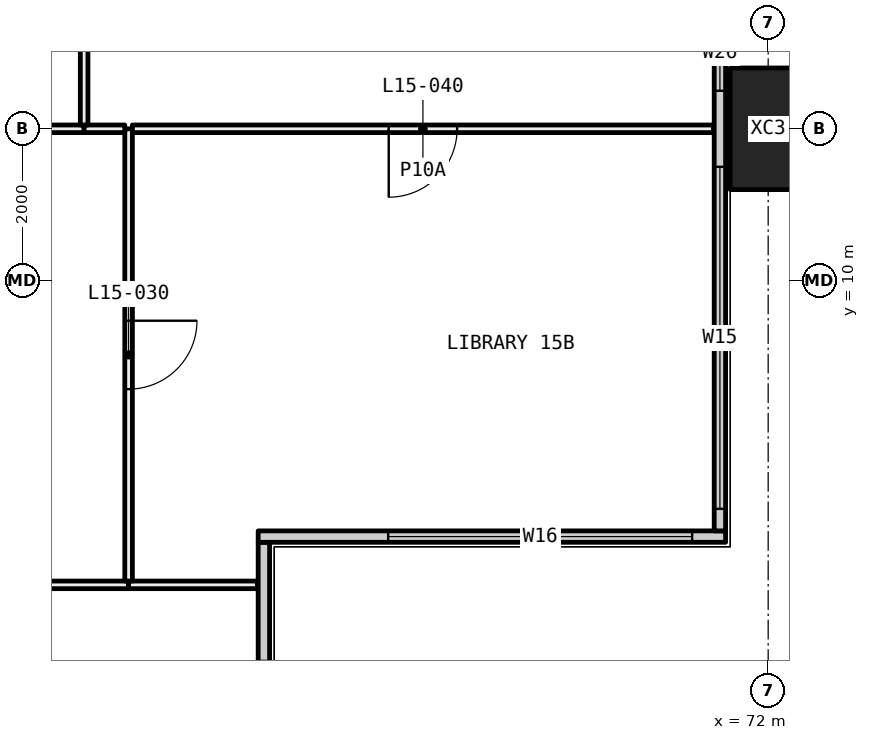
"""IFC4 building model, lengths in metres.
Left out: names, types, materials, properties, quantities, classifications, styles, units other than length and angle.
Written with IfcOpenShell. Run it as: python <this file> out.ifc"""

import sys

from ifc_helpers import new_model, si_unit, direction, frame, frame_2d, origin, origin_2d, place, context, subcontext, project, spatial, rectangle, hollow_rectangle, extrude, element, fill, save


model = new_model("IFC4")
c1 = context("Model", 3, precision=1e-05, world=origin(), true_north=direction((0.0, 1.0)))
c2 = subcontext(c1, "Body", "Model", "MODEL_VIEW")
j1 = project(units=[si_unit("LENGTHUNIT", "METRE"), si_unit("PLANEANGLEUNIT", "RADIAN")], contexts=[c1])
p1 = place(None, origin())
s1 = spatial("IfcSite", under=j1, at=p1, CompositionType="ELEMENT")
p2 = place(p1, origin())
s2 = spatial("IfcBuilding", under=s1, at=p2, CompositionType="ELEMENT")
p3 = place(p2, frame((0.0, 0.0, 64.5)))
s3 = spatial("IfcBuildingStorey", under=s2, at=p3, CompositionType="ELEMENT", Elevation=64.5)
p4 = place(p3, frame((72.0, 12.0, -0.4), z_axis=(0.0, 0.0, 1.0), x_axis=(0.0, 1.0, 0.0)))
e1 = element("IfcColumn", 1, at=p4, inside=s3, PredefinedType="COLUMN", context=c2, shape_type="SweptSolid", body=[
    extrude(hollow_rectangle(XDim=1.6, YDim=1.0, WallThickness=0.065, at=origin_2d()), origin(), (0.0, 0.0, 1.0), 3.45),
])
p5 = place(p3, frame((65.365, 0.71, 0.0), z_axis=(0.0, 0.0, 1.0), x_axis=(0.0, 1.0, 0.0)))
e2 = element("IfcWall", 2, at=p5, inside=s3, PredefinedType="ELEMENTEDWALL", context=c2, shape_type="SweptSolid", body=[
    extrude(rectangle(XDim=5.85, YDim=0.15, at=frame_2d((2.925, 0.0))), origin(), (0.0, 0.0, 1.0), 3.05),
])
p6 = place(p5, frame((0.29, 0.0, 0.45)))
e3 = element("IfcOpeningElement", 3, at=p6, cuts=e2, PredefinedType="OPENING", context=c2, shape_type="SweptSolid", body=[
    extrude(rectangle(XDim=4.0, YDim=2.55, at=frame_2d((2.0, 1.275))), frame((0.0, 0.085, 0.0), z_axis=(0.0, -1.0, 0.0), x_axis=(1.0, 0.0, 0.0)), (0.0, 0.0, 1.0), 0.17),
])
p7 = place(p3, frame((65.29, 6.635, 0.0), z_axis=(0.0, 0.0, 1.0), x_axis=(1.0, 0.0, 0.0)))
e4 = element("IfcWall", 4, at=p7, inside=s3, PredefinedType="ELEMENTEDWALL", context=c2, shape_type="SweptSolid", body=[
    extrude(rectangle(XDim=6.15, YDim=0.15, at=frame_2d((3.075, 0.0))), origin(), (0.0, 0.0, 1.0), 3.05),
])
p8 = place(p7, frame((1.71, 0.0, 0.45)))
e5 = element("IfcOpeningElement", 5, at=p8, cuts=e4, PredefinedType="OPENING", context=c2, shape_type="SweptSolid", body=[
    extrude(rectangle(XDim=4.0, YDim=2.55, at=frame_2d((2.0, 1.275))), frame((0.0, 0.085, 0.0), z_axis=(0.0, -1.0, 0.0), x_axis=(1.0, 0.0, 0.0)), (0.0, 0.0, 1.0), 0.17),
])
p9 = place(p3, frame((71.365, 6.71, 0.0), z_axis=(0.0, 0.0, 1.0), x_axis=(0.0, 1.0, 0.0)))
e6 = element("IfcWall", 6, at=p9, inside=s3, PredefinedType="ELEMENTEDWALL", context=c2, shape_type="SweptSolid", body=[
    extrude(rectangle(XDim=34.58, YDim=0.15, at=frame_2d((17.29, 0.0))), origin(), (0.0, 0.0, 1.0), 3.05),
])
p10 = place(p9, frame((0.29, 0.0, 0.45)))
e7 = element("IfcOpeningElement", 7, at=p10, cuts=e6, PredefinedType="OPENING", context=c2, shape_type="SweptSolid", body=[
    extrude(rectangle(XDim=4.5, YDim=2.55, at=frame_2d((2.25, 1.275))), frame((0.0, 0.085, 0.0), z_axis=(0.0, -1.0, 0.0), x_axis=(1.0, 0.0, 0.0)), (0.0, 0.0, 1.0), 0.17),
])
p11 = place(p9, frame((5.79, 0.0, 0.45)))
e8 = element("IfcOpeningElement", 8, at=p11, cuts=e6, PredefinedType="OPENING", context=c2, shape_type="SweptSolid", body=[
    extrude(rectangle(XDim=1.0, YDim=2.55, at=frame_2d((0.5, 1.275))), frame((0.0, 0.085, 0.0), z_axis=(0.0, -1.0, 0.0), x_axis=(1.0, 0.0, 0.0)), (0.0, 0.0, 1.0), 0.17),
])
p12 = place(p9, frame((9.54, 0.0, 0.45)))
e9 = element("IfcOpeningElement", 9, at=p12, cuts=e6, PredefinedType="OPENING", context=c2, shape_type="SweptSolid", body=[
    extrude(rectangle(XDim=1.25, YDim=2.55, at=frame_2d((0.625, 1.275))), frame((0.0, 0.085, 0.0), z_axis=(0.0, -1.0, 0.0), x_axis=(1.0, 0.0, 0.0)), (0.0, 0.0, 1.0), 0.17),
])
p13 = place(p9, frame((11.79, 0.0, 0.45)))
e10 = element("IfcOpeningElement", 10, at=p13, cuts=e6, PredefinedType="OPENING", context=c2, shape_type="SweptSolid", body=[
    extrude(rectangle(XDim=1.25, YDim=2.55, at=frame_2d((0.625, 1.275))), frame((0.0, 0.085, 0.0), z_axis=(0.0, -1.0, 0.0), x_axis=(1.0, 0.0, 0.0)), (0.0, 0.0, 1.0), 0.17),
])
p14 = place(p9, frame((15.79, 0.0, 0.45)))
e11 = element("IfcOpeningElement", 11, at=p14, cuts=e6, PredefinedType="OPENING", context=c2, shape_type="SweptSolid", body=[
    extrude(rectangle(XDim=1.0, YDim=2.55, at=frame_2d((0.5, 1.275))), frame((0.0, 0.085, 0.0), z_axis=(0.0, -1.0, 0.0), x_axis=(1.0, 0.0, 0.0)), (0.0, 0.0, 1.0), 0.17),
])
p15 = place(p9, frame((17.79, 0.0, 0.45)))
e12 = element("IfcOpeningElement", 12, at=p15, cuts=e6, PredefinedType="OPENING", context=c2, shape_type="SweptSolid", body=[
    extrude(rectangle(XDim=1.0, YDim=2.55, at=frame_2d((0.5, 1.275))), frame((0.0, 0.085, 0.0), z_axis=(0.0, -1.0, 0.0), x_axis=(1.0, 0.0, 0.0)), (0.0, 0.0, 1.0), 0.17),
])
p16 = place(p9, frame((21.54, 0.0, 0.45)))
e13 = element("IfcOpeningElement", 13, at=p16, cuts=e6, PredefinedType="OPENING", context=c2, shape_type="SweptSolid", body=[
    extrude(rectangle(XDim=1.25, YDim=2.55, at=frame_2d((0.625, 1.275))), frame((0.0, 0.085, 0.0), z_axis=(0.0, -1.0, 0.0), x_axis=(1.0, 0.0, 0.0)), (0.0, 0.0, 1.0), 0.17),
])
p17 = place(p9, frame((23.79, 0.0, 0.45)))
e14 = element("IfcOpeningElement", 14, at=p17, cuts=e6, PredefinedType="OPENING", context=c2, shape_type="SweptSolid", body=[
    extrude(rectangle(XDim=1.25, YDim=2.55, at=frame_2d((0.625, 1.275))), frame((0.0, 0.085, 0.0), z_axis=(0.0, -1.0, 0.0), x_axis=(1.0, 0.0, 0.0)), (0.0, 0.0, 1.0), 0.17),
])
p18 = place(p9, frame((27.79, 0.0, 0.45)))
e15 = element("IfcOpeningElement", 15, at=p18, cuts=e6, PredefinedType="OPENING", context=c2, shape_type="SweptSolid", body=[
    extrude(rectangle(XDim=1.0, YDim=2.55, at=frame_2d((0.5, 1.275))), frame((0.0, 0.085, 0.0), z_axis=(0.0, -1.0, 0.0), x_axis=(1.0, 0.0, 0.0)), (0.0, 0.0, 1.0), 0.17),
])
p19 = place(p9, frame((29.79, 0.0, 0.45)))
e16 = element("IfcOpeningElement", 16, at=p19, cuts=e6, PredefinedType="OPENING", context=c2, shape_type="SweptSolid", body=[
    extrude(rectangle(XDim=4.5, YDim=2.55, at=frame_2d((2.25, 1.275))), frame((0.0, 0.085, 0.0), z_axis=(0.0, -1.0, 0.0), x_axis=(1.0, 0.0, 0.0)), (0.0, 0.0, 1.0), 0.17),
])
p20 = place(p3, frame((63.585, 6.0, 0.0), z_axis=(0.0, 0.0, 1.0), x_axis=(-1.0, 0.0, 0.0)))
e17 = element("IfcWall", 17, at=p20, inside=s3, PredefinedType="PARTITIONING", context=c2, shape_type="SweptSolid", body=[
    extrude(rectangle(XDim=3.535, YDim=0.1, at=frame_2d((1.768, 0.0))), origin(), (0.0, 0.0, 1.0), 2.45),
])
p21 = place(p20, frame((1.317, 0.0, 0.0)))
e18 = element("IfcOpeningElement", 18, at=p21, cuts=e17, PredefinedType="OPENING", context=c2, shape_type="SweptSolid", body=[
    extrude(rectangle(XDim=0.9, YDim=2.1, at=frame_2d((0.45, 1.05))), frame((0.0, 0.06, 0.0), z_axis=(0.0, -1.0, 0.0), x_axis=(1.0, 0.0, 0.0)), (0.0, 0.0, 1.0), 0.12),
])
p22 = place(p3, frame((65.28, 6.0, 0.0), z_axis=(0.0, 0.0, 1.0), x_axis=(-1.0, 0.0, 0.0)))
e19 = element("IfcWall", 19, at=p22, inside=s3, PredefinedType="PARTITIONING", context=c2, shape_type="SweptSolid", body=[
    extrude(rectangle(XDim=1.695, YDim=0.1, at=frame_2d((0.848, 0.0))), origin(), (0.0, 0.0, 1.0), 3.05),
])
p23 = place(p3, frame((63.585, 6.05, 0.0), z_axis=(0.0, 0.0, 1.0), x_axis=(0.0, 1.0, 0.0)))
e20 = element("IfcWall", 20, at=p23, inside=s3, PredefinedType="PARTITIONING", context=c2, shape_type="SweptSolid", body=[
    extrude(rectangle(XDim=5.95, YDim=0.1, at=frame_2d((2.975, 0.0))), origin(), (0.0, 0.0, 1.0), 2.45),
])
p24 = place(p23, frame((2.525, 0.0, 0.0)))
e21 = element("IfcOpeningElement", 21, at=p24, cuts=e20, PredefinedType="OPENING", context=c2, shape_type="SweptSolid", body=[
    extrude(rectangle(XDim=0.9, YDim=2.1, at=frame_2d((0.45, 1.05))), frame((0.0, 0.06, 0.0), z_axis=(0.0, -1.0, 0.0), x_axis=(1.0, 0.0, 0.0)), (0.0, 0.0, 1.0), 0.12),
])
p25 = place(p3, frame((63.0, 12.0, 0.0), z_axis=(0.0, 0.0, 1.0), x_axis=(-1.0, 0.0, 0.0)))
e22 = element("IfcWall", 22, at=p25, inside=s3, PredefinedType="PARTITIONING", context=c2, shape_type="SweptSolid", body=[
    extrude(rectangle(XDim=2.2, YDim=0.1, at=frame_2d((1.1, 0.0))), origin(), (0.0, 0.0, 1.0), 2.45),
])
p26 = place(p3, frame((63.535, 12.0, 0.0), z_axis=(0.0, 0.0, 1.0), x_axis=(-1.0, 0.0, 0.0)))
e23 = element("IfcWall", 23, at=p26, inside=s3, PredefinedType="PARTITIONING", context=c2, shape_type="SweptSolid", body=[
    extrude(rectangle(XDim=0.535, YDim=0.1, at=frame_2d((0.268, 0.0))), origin(), (0.0, 0.0, 1.0), 2.45),
])
p27 = place(p3, frame((71.28, 12.0, 0.0), z_axis=(0.0, 0.0, 1.0), x_axis=(-1.0, 0.0, 0.0)))
e24 = element("IfcWall", 24, at=p27, inside=s3, PredefinedType="PARTITIONING", context=c2, shape_type="SweptSolid", body=[
    extrude(rectangle(XDim=7.645, YDim=0.1, at=frame_2d((3.823, 0.0))), origin(), (0.0, 0.0, 1.0), 2.45),
])
p28 = place(p27, frame((3.373, 0.0, 0.0)))
e25 = element("IfcOpeningElement", 25, at=p28, cuts=e24, PredefinedType="OPENING", context=c2, shape_type="SweptSolid", body=[
    extrude(rectangle(XDim=0.9, YDim=2.1, at=frame_2d((0.45, 1.05))), frame((0.0, 0.06, 0.0), z_axis=(0.0, -1.0, 0.0), x_axis=(1.0, 0.0, 0.0)), (0.0, 0.0, 1.0), 0.12),
])
p29 = place(p3, frame((63.0, 12.05, 0.0), z_axis=(0.0, 0.0, 1.0), x_axis=(0.0, 1.0, 0.0)))
e26 = element("IfcWall", 26, at=p29, inside=s3, PredefinedType="PARTITIONING", context=c2, shape_type="SweptSolid", body=[
    extrude(rectangle(XDim=5.85, YDim=0.1, at=frame_2d((2.925, 0.0))), origin(), (0.0, 0.0, 1.0), 2.45),
])
p30 = place(p8, origin())
e27 = element("IfcWindow", 27, at=p30, inside=s3, PartitioningType="SINGLE_PANEL", PredefinedType="WINDOW", context=c2, shape_type="SweptSolid", body=[
    extrude(rectangle(XDim=4.0, YDim=2.55, at=frame_2d((2.0, 1.275))), frame((0.0, 0.03, 0.0), z_axis=(0.0, -1.0, 0.0), x_axis=(1.0, 0.0, 0.0)), (0.0, 0.0, 1.0), 0.06),
])
fill(e5, e27)
p31 = place(p10, origin())
e28 = element("IfcWindow", 28, at=p31, inside=s3, PartitioningType="SINGLE_PANEL", PredefinedType="WINDOW", context=c2, shape_type="SweptSolid", body=[
    extrude(rectangle(XDim=4.5, YDim=2.55, at=frame_2d((2.25, 1.275))), frame((0.0, 0.03, 0.0), z_axis=(0.0, -1.0, 0.0), x_axis=(1.0, 0.0, 0.0)), (0.0, 0.0, 1.0), 0.06),
])
fill(e7, e28)
p32 = place(p11, origin())
e29 = element("IfcWindow", 29, at=p32, inside=s3, PartitioningType="SINGLE_PANEL", PredefinedType="WINDOW", context=c2, shape_type="SweptSolid", body=[
    extrude(rectangle(XDim=1.0, YDim=2.55, at=frame_2d((0.5, 1.275))), frame((0.0, 0.03, 0.0), z_axis=(0.0, -1.0, 0.0), x_axis=(1.0, 0.0, 0.0)), (0.0, 0.0, 1.0), 0.06),
])
fill(e8, e29)
p33 = place(p24, frame((0.9, 0.0, 0.0), x_axis=(-1.0, 0.0, 0.0)))
e30 = element("IfcDoor", 30, at=p33, inside=s3, OperationType="SINGLE_SWING_RIGHT", PredefinedType="DOOR", context=c2, shape_type="SweptSolid", body=[
    extrude(rectangle(XDim=0.9, YDim=2.1, at=frame_2d((0.45, 1.05))), frame((0.0, 0.025, 0.0), z_axis=(0.0, -1.0, 0.0), x_axis=(1.0, 0.0, 0.0)), (0.0, 0.0, 1.0), 0.05),
])
fill(e21, e30)
p34 = place(p28, origin())
e31 = element("IfcDoor", 31, at=p34, inside=s3, OperationType="SINGLE_SWING_LEFT", PredefinedType="DOOR", context=c2, shape_type="SweptSolid", body=[
    extrude(rectangle(XDim=0.9, YDim=2.1, at=frame_2d((0.45, 1.05))), frame((0.0, 0.025, 0.0), z_axis=(0.0, -1.0, 0.0), x_axis=(1.0, 0.0, 0.0)), (0.0, 0.0, 1.0), 0.05),
])
fill(e25, e31)
save(model, sys.argv[1])
